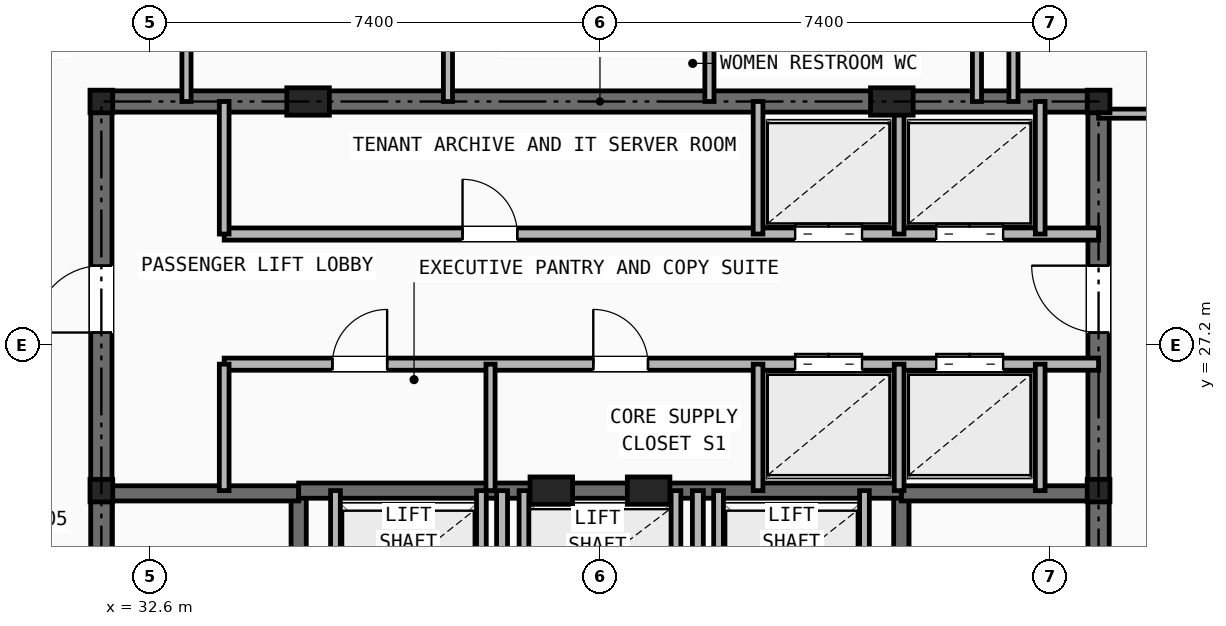
"""IFC4 building model, lengths in metres.
Left out: names, types, materials, properties, quantities, classifications, styles, units other than length and angle.
Written with IfcOpenShell. Run it as: python <this file> out.ifc"""

import sys

from ifc_helpers import new_model, si_unit, direction, frame, frame_2d, origin, origin_2d, place, context, subcontext, project, spatial, rectangle, i_section, extrude, element, fill, save


model = new_model("IFC4")
c1 = context("Model", 3, precision=1e-05, world=origin(), true_north=direction((0.0, 1.0)))
c2 = subcontext(c1, "Body", "Model", "MODEL_VIEW")
j1 = project(units=[si_unit("LENGTHUNIT", "METRE"), si_unit("PLANEANGLEUNIT", "RADIAN")], contexts=[c1])
p1 = place(None, origin())
s1 = spatial("IfcSite", under=j1, at=p1, CompositionType="ELEMENT")
p2 = place(p1, origin())
s2 = spatial("IfcBuilding", under=s1, at=p2, CompositionType="ELEMENT")
p3 = place(p2, frame((0.0, 0.0, 269.0)))
s3 = spatial("IfcBuildingStorey", under=s2, at=p3, CompositionType="ELEMENT", Elevation=269.0)
for number, where, z_axis, x_axis in (
    (1, (31.8, 24.8, 0.0), (0.0, 0.0, 1.0), (1.0, 0.0, 0.0)),
    (2, (48.2, 24.8, 0.0), (0.0, 0.0, 1.0), (1.0, 0.0, 0.0)),
    (3, (31.8, 31.2, 0.0), (0.0, 0.0, 1.0), (1.0, 0.0, 0.0)),
    (4, (48.2, 31.2, 0.0), (0.0, 0.0, 1.0), (1.0, 0.0, 0.0)),
):
    element("IfcColumn", number, at=place(p3, frame(where, z_axis=z_axis, x_axis=x_axis)), inside=s3, PredefinedType="COLUMN", context=c2, shape_type="SweptSolid", body=[
        extrude(i_section(OverallWidth=0.374, OverallDepth=0.372, WebThickness=0.016, FlangeThickness=0.026, at=origin_2d()), origin(), (0.0, 0.0, 1.0), 3.5),
    ])
for number, where, z_axis, x_axis in (
    (5, (35.2, 31.2, 0.0), (0.0, 0.0, 1.0), (1.0, 0.0, 0.0)),
    (6, (44.8, 31.2, 0.0), (0.0, 0.0, 1.0), (1.0, 0.0, 0.0)),
    (7, (39.2, 24.8, 0.0), (0.0, 0.0, 1.0), (1.0, 0.0, 0.0)),
    (8, (40.8, 24.8, 0.0), (0.0, 0.0, 1.0), (1.0, 0.0, 0.0)),
):
    element("IfcColumn", number, at=place(p3, frame(where, z_axis=z_axis, x_axis=x_axis)), inside=s3, PredefinedType="PILASTER", context=c2, shape_type="SweptSolid", body=[
        extrude(rectangle(XDim=0.7, YDim=0.45, at=origin_2d()), origin(), (0.0, 0.0, 1.0), 3.5),
    ])
p4 = place(p3, frame((31.8, 31.2, 0.0), z_axis=(0.0, 0.0, 1.0), x_axis=(1.0, 0.0, 0.0)))
e9 = element("IfcWall", 9, at=p4, inside=s3, PredefinedType="SHEAR", context=c2, shape_type="SweptSolid", body=[
    extrude(rectangle(XDim=16.4, YDim=0.35, at=frame_2d((8.2, 0.0))), origin(), (0.0, 0.0, 1.0), 3.25),
])
p5 = place(p3, frame((31.8, 16.4, 0.0), z_axis=(0.0, 0.0, 1.0), x_axis=(0.0, 1.0, 0.0)))
e10 = element("IfcWall", 10, at=p5, inside=s3, PredefinedType="SHEAR", context=c2, shape_type="SweptSolid", body=[
    extrude(rectangle(XDim=14.8, YDim=0.35, at=frame_2d((7.4, 0.0))), origin(), (0.0, 0.0, 1.0), 3.25),
])
p6 = place(p5, frame((11.0, 0.0, 0.0)))
e11 = element("IfcOpeningElement", 11, at=p6, cuts=e10, PredefinedType="OPENING", context=c2, shape_type="SweptSolid", body=[
    extrude(rectangle(XDim=1.1, YDim=2.15, at=frame_2d((0.55, 1.075))), frame((0.0, 0.185, 0.0), z_axis=(0.0, -1.0, 0.0), x_axis=(1.0, 0.0, 0.0)), (0.0, 0.0, 1.0), 0.37),
])
p7 = place(p3, frame((48.2, 16.4, 0.0), z_axis=(0.0, 0.0, 1.0), x_axis=(0.0, 1.0, 0.0)))
e12 = element("IfcWall", 12, at=p7, inside=s3, PredefinedType="SHEAR", context=c2, shape_type="SweptSolid", body=[
    extrude(rectangle(XDim=14.8, YDim=0.35, at=frame_2d((7.4, 0.0))), origin(), (0.0, 0.0, 1.0), 3.25),
])
p8 = place(p7, frame((11.0, 0.0, 0.0)))
e13 = element("IfcOpeningElement", 13, at=p8, cuts=e12, PredefinedType="OPENING", context=c2, shape_type="SweptSolid", body=[
    extrude(rectangle(XDim=1.1, YDim=2.15, at=frame_2d((0.55, 1.075))), frame((0.0, 0.185, 0.0), z_axis=(0.0, -1.0, 0.0), x_axis=(1.0, 0.0, 0.0)), (0.0, 0.0, 1.0), 0.37),
])
p9 = place(p3, frame((35.045, 16.4, 0.0), z_axis=(0.0, 0.0, 1.0), x_axis=(0.0, 1.0, 0.0)))
e14 = element("IfcWall", 14, at=p9, inside=s3, PredefinedType="SHEAR", context=c2, shape_type="SweptSolid", body=[
    extrude(rectangle(XDim=8.4, YDim=0.25, at=frame_2d((4.2, 0.0))), origin(), (0.0, 0.0, 1.0), 3.25),
])
p10 = place(p9, frame((0.45, 0.0, 0.0)))
e15 = element("IfcOpeningElement", 15, at=p10, cuts=e14, PredefinedType="OPENING", context=c2, shape_type="SweptSolid", body=[
    extrude(rectangle(XDim=0.95, YDim=2.1, at=frame_2d((0.475, 1.05))), frame((0.0, 0.135, 0.0), z_axis=(0.0, -1.0, 0.0), x_axis=(1.0, 0.0, 0.0)), (0.0, 0.0, 1.0), 0.27),
])
p11 = place(p3, frame((31.8, 24.755, 0.0), z_axis=(0.0, 0.0, 1.0), x_axis=(1.0, 0.0, 0.0)))
e16 = element("IfcWall", 16, at=p11, inside=s3, PredefinedType="SHEAR", context=c2, shape_type="SweptSolid", body=[
    extrude(rectangle(XDim=3.245, YDim=0.25, at=frame_2d((1.623, 0.0))), origin(), (0.0, 0.0, 1.0), 3.25),
])
p12 = place(p3, frame((44.955, 16.4, 0.0), z_axis=(0.0, 0.0, 1.0), x_axis=(0.0, 1.0, 0.0)))
e17 = element("IfcWall", 17, at=p12, inside=s3, PredefinedType="SHEAR", context=c2, shape_type="SweptSolid", body=[
    extrude(rectangle(XDim=8.4, YDim=0.25, at=frame_2d((4.2, 0.0))), origin(), (0.0, 0.0, 1.0), 3.25),
])
p13 = place(p12, frame((0.45, 0.0, 0.0)))
e18 = element("IfcOpeningElement", 18, at=p13, cuts=e17, PredefinedType="OPENING", context=c2, shape_type="SweptSolid", body=[
    extrude(rectangle(XDim=0.95, YDim=2.1, at=frame_2d((0.475, 1.05))), frame((0.0, 0.135, 0.0), z_axis=(0.0, -1.0, 0.0), x_axis=(1.0, 0.0, 0.0)), (0.0, 0.0, 1.0), 0.27),
])
p14 = place(p3, frame((44.955, 24.755, 0.0), z_axis=(0.0, 0.0, 1.0), x_axis=(1.0, 0.0, 0.0)))
e19 = element("IfcWall", 19, at=p14, inside=s3, PredefinedType="SHEAR", context=c2, shape_type="SweptSolid", body=[
    extrude(rectangle(XDim=3.245, YDim=0.25, at=frame_2d((1.623, 0.0))), origin(), (0.0, 0.0, 1.0), 3.25),
])
p15 = place(p3, frame((35.045, 24.8, 0.0), z_axis=(0.0, 0.0, 1.0), x_axis=(1.0, 0.0, 0.0)))
e20 = element("IfcWall", 20, at=p15, inside=s3, PredefinedType="SHEAR", context=c2, shape_type="SweptSolid", body=[
    extrude(rectangle(XDim=9.91, YDim=0.25, at=frame_2d((4.955, 0.0))), origin(), (0.0, 0.0, 1.0), 3.25),
])
p16 = place(p3, frame((38.39, 16.4, 0.0), z_axis=(0.0, 0.0, 1.0), x_axis=(0.0, 1.0, 0.0)))
e21 = element("IfcWall", 21, at=p16, inside=s3, PredefinedType="PARTITIONING", context=c2, shape_type="SweptSolid", body=[
    extrude(rectangle(XDim=8.4, YDim=0.18, at=frame_2d((4.2, 0.0))), origin(), (0.0, 0.0, 1.0), 2.705),
])
p17 = place(p16, frame((1.8, 0.0, 0.0)))
e22 = element("IfcOpeningElement", 22, at=p17, cuts=e21, PredefinedType="OPENING", context=c2, shape_type="SweptSolid", body=[
    extrude(rectangle(XDim=0.85, YDim=2.05, at=frame_2d((0.425, 1.025))), frame((0.0, 0.1, 0.0), z_axis=(0.0, -1.0, 0.0), x_axis=(1.0, 0.0, 0.0)), (0.0, 0.0, 1.0), 0.2),
])
p18 = place(p16, frame((4.35, 0.0, 0.0)))
e23 = element("IfcOpeningElement", 23, at=p18, cuts=e21, PredefinedType="OPENING", context=c2, shape_type="SweptSolid", body=[
    extrude(rectangle(XDim=0.95, YDim=2.1, at=frame_2d((0.475, 1.05))), frame((0.0, 0.1, 0.0), z_axis=(0.0, -1.0, 0.0), x_axis=(1.0, 0.0, 0.0)), (0.0, 0.0, 1.0), 0.2),
])
p19 = place(p3, frame((41.61, 16.4, 0.0), z_axis=(0.0, 0.0, 1.0), x_axis=(0.0, 1.0, 0.0)))
e24 = element("IfcWall", 24, at=p19, inside=s3, PredefinedType="PARTITIONING", context=c2, shape_type="SweptSolid", body=[
    extrude(rectangle(XDim=8.4, YDim=0.18, at=frame_2d((4.2, 0.0))), origin(), (0.0, 0.0, 1.0), 2.705),
])
p20 = place(p19, frame((1.8, 0.0, 0.0)))
e25 = element("IfcOpeningElement", 25, at=p20, cuts=e24, PredefinedType="OPENING", context=c2, shape_type="SweptSolid", body=[
    extrude(rectangle(XDim=0.85, YDim=2.05, at=frame_2d((0.425, 1.025))), frame((0.0, 0.1, 0.0), z_axis=(0.0, -1.0, 0.0), x_axis=(1.0, 0.0, 0.0)), (0.0, 0.0, 1.0), 0.2),
])
for number, where, z_axis, x_axis in (
    (26, (35.65, 22.48, 0.0), (0.0, 0.0, 1.0), (0.0, 1.0, 0.0)),
    (27, (38.05, 22.48, 0.0), (0.0, 0.0, 1.0), (0.0, 1.0, 0.0)),
    (28, (41.95, 22.48, 0.0), (0.0, 0.0, 1.0), (0.0, 1.0, 0.0)),
    (29, (44.35, 22.48, 0.0), (0.0, 0.0, 1.0), (0.0, 1.0, 0.0)),
    (30, (38.75, 22.48, 0.0), (0.0, 0.0, 1.0), (0.0, 1.0, 0.0)),
    (31, (41.25, 22.48, 0.0), (0.0, 0.0, 1.0), (0.0, 1.0, 0.0)),
):
    element("IfcWall", number, at=place(p3, frame(where, z_axis=z_axis, x_axis=x_axis)), inside=s3, PredefinedType="SOLIDWALL", context=c2, shape_type="SweptSolid", body=[
        extrude(rectangle(XDim=2.32, YDim=0.16, at=frame_2d((1.16, 0.0))), origin(), (0.0, 0.0, 1.0), 3.25),
    ])
p21 = place(p3, frame((33.82, 29.02, 0.0), z_axis=(0.0, 0.0, 1.0), x_axis=(1.0, 0.0, 0.0)))
e32 = element("IfcWall", 32, at=p21, inside=s3, PredefinedType="SOLIDWALL", context=c2, shape_type="SweptSolid", body=[
    extrude(rectangle(XDim=14.38, YDim=0.2, at=frame_2d((7.19, 0.0))), origin(), (0.0, 0.0, 1.0), 2.705),
])
p22 = place(p21, frame((3.92, 0.0, 0.0)))
e33 = element("IfcOpeningElement", 33, at=p22, cuts=e32, PredefinedType="OPENING", context=c2, shape_type="SweptSolid", body=[
    extrude(rectangle(XDim=0.9, YDim=2.1, at=frame_2d((0.45, 1.05))), frame((0.0, 0.11, 0.0), z_axis=(0.0, -1.0, 0.0), x_axis=(1.0, 0.0, 0.0)), (0.0, 0.0, 1.0), 0.22),
])
p23 = place(p21, frame((9.39, 0.0, 0.0)))
e34 = element("IfcOpeningElement", 34, at=p23, cuts=e32, PredefinedType="OPENING", context=c2, shape_type="SweptSolid", body=[
    extrude(rectangle(XDim=1.1, YDim=2.15, at=frame_2d((0.55, 1.075))), frame((0.0, 0.11, 0.0), z_axis=(0.0, -1.0, 0.0), x_axis=(1.0, 0.0, 0.0)), (0.0, 0.0, 1.0), 0.22),
])
p24 = place(p21, frame((11.71, 0.0, 0.0)))
e35 = element("IfcOpeningElement", 35, at=p24, cuts=e32, PredefinedType="OPENING", context=c2, shape_type="SweptSolid", body=[
    extrude(rectangle(XDim=1.1, YDim=2.15, at=frame_2d((0.55, 1.075))), frame((0.0, 0.11, 0.0), z_axis=(0.0, -1.0, 0.0), x_axis=(1.0, 0.0, 0.0)), (0.0, 0.0, 1.0), 0.22),
])
p25 = place(p3, frame((33.82, 26.88, 0.0), z_axis=(0.0, 0.0, 1.0), x_axis=(1.0, 0.0, 0.0)))
e36 = element("IfcWall", 36, at=p25, inside=s3, PredefinedType="SOLIDWALL", context=c2, shape_type="SweptSolid", body=[
    extrude(rectangle(XDim=14.38, YDim=0.2, at=frame_2d((7.19, 0.0))), origin(), (0.0, 0.0, 1.0), 2.705),
])
p26 = place(p25, frame((1.78, 0.0, 0.0)))
e37 = element("IfcOpeningElement", 37, at=p26, cuts=e36, PredefinedType="OPENING", context=c2, shape_type="SweptSolid", body=[
    extrude(rectangle(XDim=0.9, YDim=2.1, at=frame_2d((0.45, 1.05))), frame((0.0, 0.11, 0.0), z_axis=(0.0, -1.0, 0.0), x_axis=(1.0, 0.0, 0.0)), (0.0, 0.0, 1.0), 0.22),
])
p27 = place(p25, frame((6.07, 0.0, 0.0)))
e38 = element("IfcOpeningElement", 38, at=p27, cuts=e36, PredefinedType="OPENING", context=c2, shape_type="SweptSolid", body=[
    extrude(rectangle(XDim=0.9, YDim=2.1, at=frame_2d((0.45, 1.05))), frame((0.0, 0.11, 0.0), z_axis=(0.0, -1.0, 0.0), x_axis=(1.0, 0.0, 0.0)), (0.0, 0.0, 1.0), 0.22),
])
p28 = place(p25, frame((9.39, 0.0, 0.0)))
e39 = element("IfcOpeningElement", 39, at=p28, cuts=e36, PredefinedType="OPENING", context=c2, shape_type="SweptSolid", body=[
    extrude(rectangle(XDim=1.1, YDim=2.15, at=frame_2d((0.55, 1.075))), frame((0.0, 0.11, 0.0), z_axis=(0.0, -1.0, 0.0), x_axis=(1.0, 0.0, 0.0)), (0.0, 0.0, 1.0), 0.22),
])
p29 = place(p25, frame((11.71, 0.0, 0.0)))
e40 = element("IfcOpeningElement", 40, at=p29, cuts=e36, PredefinedType="OPENING", context=c2, shape_type="SweptSolid", body=[
    extrude(rectangle(XDim=1.1, YDim=2.15, at=frame_2d((0.55, 1.075))), frame((0.0, 0.11, 0.0), z_axis=(0.0, -1.0, 0.0), x_axis=(1.0, 0.0, 0.0)), (0.0, 0.0, 1.0), 0.22),
])
p30 = place(p3, frame((33.82, 29.02, 0.0), z_axis=(0.0, 0.0, 1.0), x_axis=(0.0, 1.0, 0.0)))
e41 = element("IfcWall", 41, at=p30, inside=s3, PredefinedType="SOLIDWALL", context=c2, shape_type="SweptSolid", body=[
    extrude(rectangle(XDim=2.18, YDim=0.16, at=frame_2d((1.09, 0.0))), origin(), (0.0, 0.0, 1.0), 2.705),
])
p31 = place(p3, frame((33.82, 24.8, 0.0), z_axis=(0.0, 0.0, 1.0), x_axis=(0.0, 1.0, 0.0)))
e42 = element("IfcWall", 42, at=p31, inside=s3, PredefinedType="SOLIDWALL", context=c2, shape_type="SweptSolid", body=[
    extrude(rectangle(XDim=2.08, YDim=0.16, at=frame_2d((1.04, 0.0))), origin(), (0.0, 0.0, 1.0), 3.25),
])
p32 = place(p3, frame((38.2, 24.8, 0.0), z_axis=(0.0, 0.0, 1.0), x_axis=(0.0, 1.0, 0.0)))
e43 = element("IfcWall", 43, at=p32, inside=s3, PredefinedType="PARTITIONING", context=c2, shape_type="SweptSolid", body=[
    extrude(rectangle(XDim=2.08, YDim=0.15, at=frame_2d((1.04, 0.0))), origin(), (0.0, 0.0, 1.0), 3.25),
])
for number, where, z_axis, x_axis in (
    (44, (42.6, 29.02, 0.0), (0.0, 0.0, 1.0), (0.0, 1.0, 0.0)),
    (45, (44.92, 29.02, 0.0), (0.0, 0.0, 1.0), (0.0, 1.0, 0.0)),
    (46, (47.24, 29.02, 0.0), (0.0, 0.0, 1.0), (0.0, 1.0, 0.0)),
):
    element("IfcWall", number, at=place(p3, frame(where, z_axis=z_axis, x_axis=x_axis)), inside=s3, PredefinedType="SOLIDWALL", context=c2, shape_type="SweptSolid", body=[
        extrude(rectangle(XDim=2.18, YDim=0.16, at=frame_2d((1.09, 0.0))), origin(), (0.0, 0.0, 1.0), 2.705),
    ])
for number, where, z_axis, x_axis in (
    (47, (42.6, 24.8, 0.0), (0.0, 0.0, 1.0), (0.0, 1.0, 0.0)),
    (48, (44.92, 24.8, 0.0), (0.0, 0.0, 1.0), (0.0, 1.0, 0.0)),
    (49, (47.24, 24.8, 0.0), (0.0, 0.0, 1.0), (0.0, 1.0, 0.0)),
):
    element("IfcWall", number, at=place(p3, frame(where, z_axis=z_axis, x_axis=x_axis)), inside=s3, PredefinedType="SOLIDWALL", context=c2, shape_type="SweptSolid", body=[
        extrude(rectangle(XDim=2.08, YDim=0.16, at=frame_2d((1.04, 0.0))), origin(), (0.0, 0.0, 1.0), 3.25),
    ])
for number, where, z_axis, x_axis in (
    (50, (33.2, 31.2, 0.0), (0.0, 0.0, 1.0), (0.0, 1.0, 0.0)),
    (51, (46.2, 31.2, 0.0), (0.0, 0.0, 1.0), (0.0, 1.0, 0.0)),
    (52, (37.5, 31.2, 0.0), (0.0, 0.0, 1.0), (0.0, 1.0, 0.0)),
    (53, (41.8, 31.2, 0.0), (0.0, 0.0, 1.0), (0.0, 1.0, 0.0)),
):
    element("IfcWall", number, at=place(p3, frame(where, z_axis=z_axis, x_axis=x_axis)), inside=s3, PredefinedType="PARTITIONING", context=c2, shape_type="SweptSolid", body=[
        extrude(rectangle(XDim=2.6, YDim=0.15, at=frame_2d((1.3, 0.0))), origin(), (0.0, 0.0, 1.0), 2.705),
    ])
p33 = place(p3, frame((46.8, 31.2, 0.0), z_axis=(0.0, 0.0, 1.0), x_axis=(0.0, 1.0, 0.0)))
e54 = element("IfcWall", 54, at=p33, inside=s3, PredefinedType="PARTITIONING", context=c2, shape_type="SweptSolid", body=[
    extrude(rectangle(XDim=4.5, YDim=0.15, at=frame_2d((2.25, 0.0))), origin(), (0.0, 0.0, 1.0), 2.705),
])
p34 = place(p3, frame((48.2, 31.0, 0.0), z_axis=(0.0, 0.0, 1.0), x_axis=(1.0, 0.0, 0.0)))
e55 = element("IfcWall", 55, at=p34, inside=s3, PredefinedType="PARTITIONING", context=c2, shape_type="SweptSolid", body=[
    extrude(rectangle(XDim=4.468, YDim=0.15, at=frame_2d((2.234, 0.0))), origin(), (0.0, 0.0, 1.0), 2.292),
])
p35 = place(p34, frame((1.4, 0.0, 0.0)))
e56 = element("IfcOpeningElement", 56, at=p35, cuts=e55, PredefinedType="OPENING", context=c2, shape_type="SweptSolid", body=[
    extrude(rectangle(XDim=0.95, YDim=2.1, at=frame_2d((0.475, 1.05))), frame((0.0, 0.085, 0.0), z_axis=(0.0, -1.0, 0.0), x_axis=(1.0, 0.0, 0.0)), (0.0, 0.0, 1.0), 0.17),
])
p36 = place(p6, origin())
e57 = element("IfcDoor", 57, at=p36, inside=s3, OperationType="SINGLE_SWING_LEFT", PredefinedType="DOOR", context=c2, shape_type="SweptSolid", body=[
    extrude(rectangle(XDim=1.1, YDim=2.15, at=frame_2d((0.55, 1.075))), frame((0.0, 0.025, 0.0), z_axis=(0.0, -1.0, 0.0), x_axis=(1.0, 0.0, 0.0)), (0.0, 0.0, 1.0), 0.05),
])
fill(e11, e57)
p37 = place(p8, origin())
e58 = element("IfcDoor", 58, at=p37, inside=s3, OperationType="SINGLE_SWING_RIGHT", PredefinedType="DOOR", context=c2, shape_type="SweptSolid", body=[
    extrude(rectangle(XDim=1.1, YDim=2.15, at=frame_2d((0.55, 1.075))), frame((0.0, 0.025, 0.0), z_axis=(0.0, -1.0, 0.0), x_axis=(1.0, 0.0, 0.0)), (0.0, 0.0, 1.0), 0.05),
])
fill(e13, e58)
p38 = place(p22, origin())
e59 = element("IfcDoor", 59, at=p38, inside=s3, OperationType="SINGLE_SWING_LEFT", PredefinedType="DOOR", context=c2, shape_type="SweptSolid", body=[
    extrude(rectangle(XDim=0.9, YDim=2.1, at=frame_2d((0.45, 1.05))), frame((0.0, 0.025, 0.0), z_axis=(0.0, -1.0, 0.0), x_axis=(1.0, 0.0, 0.0)), (0.0, 0.0, 1.0), 0.05),
])
fill(e33, e59)
p39 = place(p26, origin())
e60 = element("IfcDoor", 60, at=p39, inside=s3, OperationType="SINGLE_SWING_RIGHT", PredefinedType="DOOR", context=c2, shape_type="SweptSolid", body=[
    extrude(rectangle(XDim=0.9, YDim=2.1, at=frame_2d((0.45, 1.05))), frame((0.0, 0.025, 0.0), z_axis=(0.0, -1.0, 0.0), x_axis=(1.0, 0.0, 0.0)), (0.0, 0.0, 1.0), 0.05),
])
fill(e37, e60)
p40 = place(p27, origin())
e61 = element("IfcDoor", 61, at=p40, inside=s3, OperationType="SINGLE_SWING_LEFT", PredefinedType="DOOR", context=c2, shape_type="SweptSolid", body=[
    extrude(rectangle(XDim=0.9, YDim=2.1, at=frame_2d((0.45, 1.05))), frame((0.0, 0.025, 0.0), z_axis=(0.0, -1.0, 0.0), x_axis=(1.0, 0.0, 0.0)), (0.0, 0.0, 1.0), 0.05),
])
fill(e38, e61)
p41 = place(p23, origin())
e62 = element("IfcDoor", 62, at=p41, inside=s3, OperationType="DOUBLE_DOOR_SLIDING", PredefinedType="DOOR", context=c2, shape_type="SweptSolid", body=[
    extrude(rectangle(XDim=1.1, YDim=2.15, at=frame_2d((0.55, 1.075))), frame((0.0, 0.025, 0.0), z_axis=(0.0, -1.0, 0.0), x_axis=(1.0, 0.0, 0.0)), (0.0, 0.0, 1.0), 0.05),
])
fill(e34, e62)
p42 = place(p24, origin())
e63 = element("IfcDoor", 63, at=p42, inside=s3, OperationType="DOUBLE_DOOR_SLIDING", PredefinedType="DOOR", context=c2, shape_type="SweptSolid", body=[
    extrude(rectangle(XDim=1.1, YDim=2.15, at=frame_2d((0.55, 1.075))), frame((0.0, 0.025, 0.0), z_axis=(0.0, -1.0, 0.0), x_axis=(1.0, 0.0, 0.0)), (0.0, 0.0, 1.0), 0.05),
])
fill(e35, e63)
p43 = place(p28, origin())
e64 = element("IfcDoor", 64, at=p43, inside=s3, OperationType="DOUBLE_DOOR_SLIDING", PredefinedType="DOOR", context=c2, shape_type="SweptSolid", body=[
    extrude(rectangle(XDim=1.1, YDim=2.15, at=frame_2d((0.55, 1.075))), frame((0.0, 0.025, 0.0), z_axis=(0.0, -1.0, 0.0), x_axis=(1.0, 0.0, 0.0)), (0.0, 0.0, 1.0), 0.05),
])
fill(e39, e64)
p44 = place(p29, origin())
e65 = element("IfcDoor", 65, at=p44, inside=s3, OperationType="DOUBLE_DOOR_SLIDING", PredefinedType="DOOR", context=c2, shape_type="SweptSolid", body=[
    extrude(rectangle(XDim=1.1, YDim=2.15, at=frame_2d((0.55, 1.075))), frame((0.0, 0.025, 0.0), z_axis=(0.0, -1.0, 0.0), x_axis=(1.0, 0.0, 0.0)), (0.0, 0.0, 1.0), 0.05),
])
fill(e40, e65)
save(model, sys.argv[1])
